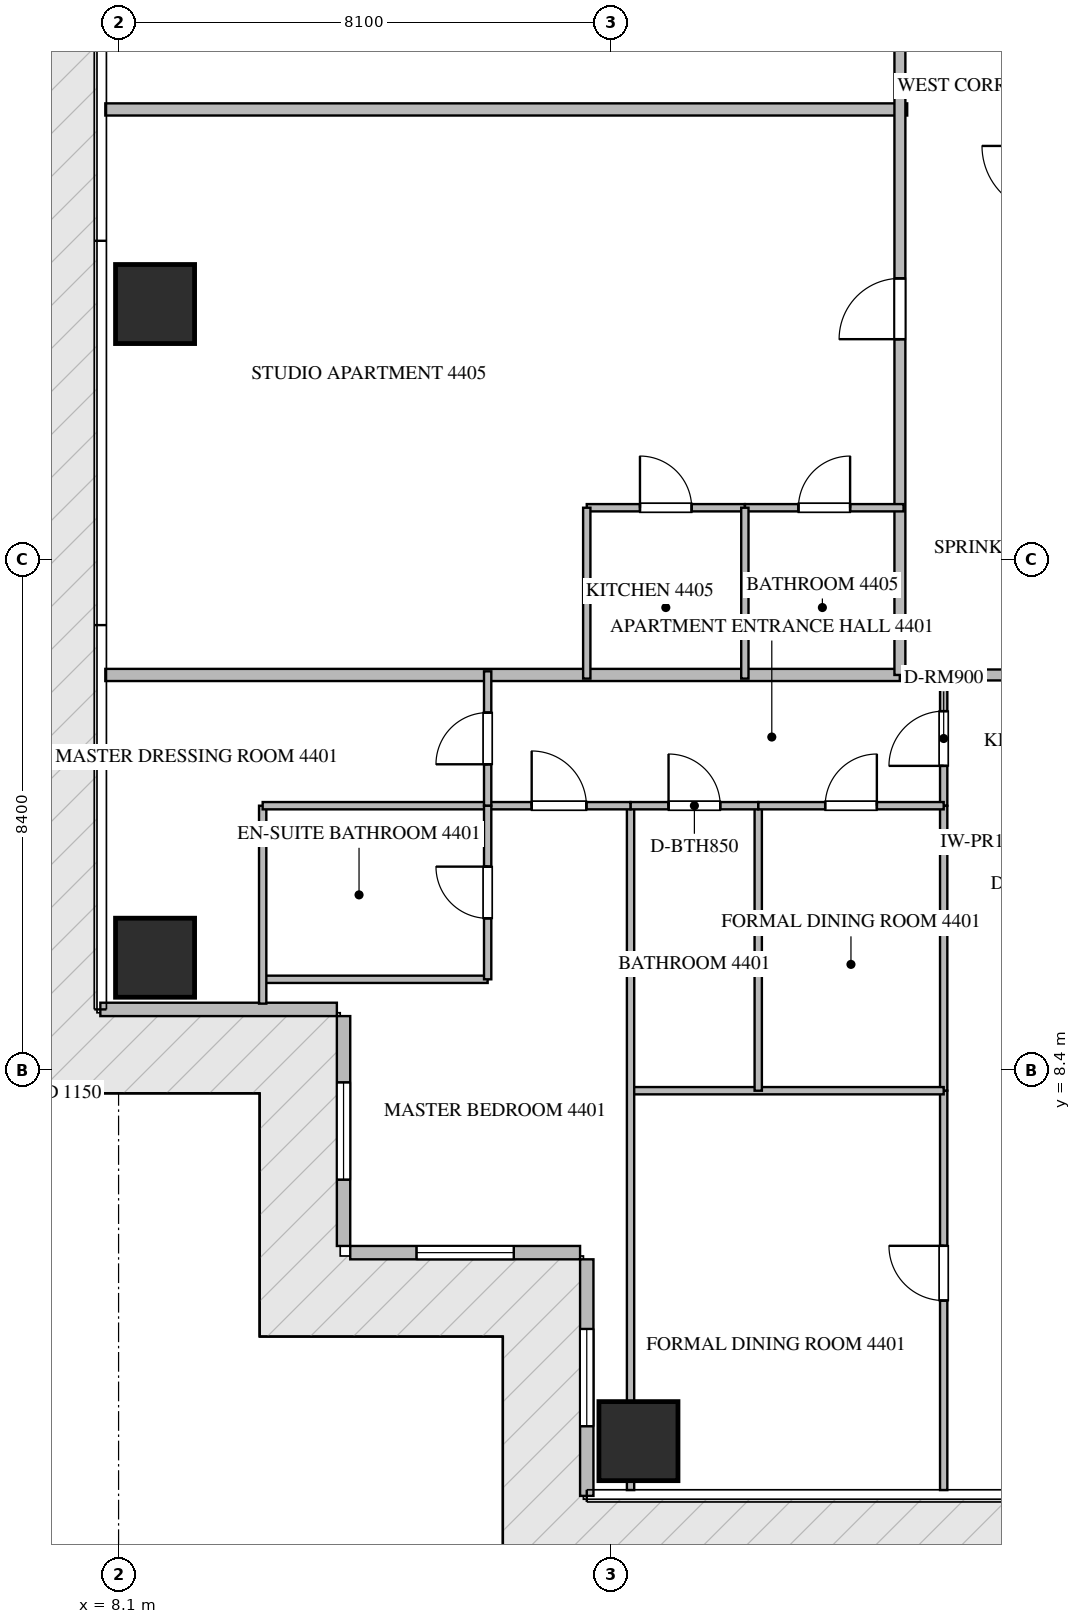
"""IFC4 building model, lengths in metres.
Left out: names, types, materials, properties, quantities, classifications, styles, units other than length and angle.
Written with IfcOpenShell. Run it as: python <this file> out.ifc"""

import sys

from ifc_helpers import new_model, si_unit, direction, frame, frame_2d, origin, origin_2d, place, context, subcontext, project, spatial, rectangle, extrude, source, transform, mapped, element, fill, save


model = new_model("IFC4")
c1 = context("Model", 3, precision=1e-05, world=origin(), true_north=direction((0.0, 1.0)))
c2 = subcontext(c1, "Body", "Model", "MODEL_VIEW")
j1 = project(units=[si_unit("LENGTHUNIT", "METRE"), si_unit("PLANEANGLEUNIT", "RADIAN")], contexts=[c1])
p1 = place(None, origin())
s1 = spatial("IfcSite", under=j1, at=p1, CompositionType="ELEMENT")
p2 = place(p1, origin())
s2 = spatial("IfcBuilding", under=s1, at=p2, CompositionType="ELEMENT")
p3 = place(p2, frame((0.0, 0.0, 176.4)))
s3 = spatial("IfcBuildingStorey", under=s2, at=p3, CompositionType="ELEMENT", Elevation=176.4)
m1 = source(origin(), c2, "Body", "SweptSolid", [
    extrude(rectangle(XDim=1.3, YDim=1.3, at=origin_2d()), origin(), (0.0, 0.0, 1.0), 3.75),
])
for number, where, z_axis, x_axis in (
    (1, (16.65, 2.3, -0.26), (0.0, 0.0, 1.0), (1.0, 0.0, 0.0)),
    (2, (8.7, 10.25, -0.26), (0.0, 0.0, 1.0), (1.0, 0.0, 0.0)),
    (3, (8.7, 21.0, -0.26), (0.0, 0.0, 1.0), (1.0, 0.0, 0.0)),
):
    element("IfcColumn", number, at=place(p3, frame(where, z_axis=z_axis, x_axis=x_axis)), inside=s3, PredefinedType="COLUMN", context=c2, shape_type="MappedRepresentation", body=[
        mapped(m1, transform((0.0, 0.0, 0.0), scale=1.0)),
    ])
p4 = place(p3, frame((7.8, 9.4, 0.0), z_axis=(0.0, 0.0, 1.0), x_axis=(1.0, 0.0, 0.0)))
e4 = element("IfcWall", 4, at=p4, inside=s3, PredefinedType="ELEMENTEDWALL", context=c2, shape_type="SweptSolid", body=[
    extrude(rectangle(XDim=3.89, YDim=0.22, at=frame_2d((1.945, 0.0))), origin(), (0.0, 0.0, 1.0), 3.475),
])
p5 = place(p3, frame((11.8, 9.29, 0.0), z_axis=(0.0, 0.0, 1.0), x_axis=(0.0, -1.0, 0.0)))
e5 = element("IfcWall", 5, at=p5, inside=s3, PredefinedType="ELEMENTEDWALL", context=c2, shape_type="SweptSolid", body=[
    extrude(rectangle(XDim=3.78, YDim=0.22, at=frame_2d((1.89, 0.0))), origin(), (0.0, 0.0, 1.0), 3.475),
])
p6 = place(p5, frame((1.09, 0.0, 0.65)))
e6 = element("IfcOpeningElement", 6, at=p6, cuts=e5, PredefinedType="OPENING", context=c2, shape_type="SweptSolid", body=[
    extrude(rectangle(XDim=1.6, YDim=2.1, at=frame_2d((0.8, 1.05))), frame((0.0, 0.12, 0.0), z_axis=(0.0, -1.0, 0.0), x_axis=(1.0, 0.0, 0.0)), (0.0, 0.0, 1.0), 0.24),
])
p7 = place(p3, frame((11.91, 5.4, 0.0), z_axis=(0.0, 0.0, 1.0), x_axis=(1.0, 0.0, 0.0)))
e7 = element("IfcWall", 7, at=p7, inside=s3, PredefinedType="ELEMENTEDWALL", context=c2, shape_type="SweptSolid", body=[
    extrude(rectangle(XDim=3.78, YDim=0.22, at=frame_2d((1.89, 0.0))), origin(), (0.0, 0.0, 1.0), 3.475),
])
p8 = place(p7, frame((1.09, 0.0, 0.65)))
e8 = element("IfcOpeningElement", 8, at=p8, cuts=e7, PredefinedType="OPENING", context=c2, shape_type="SweptSolid", body=[
    extrude(rectangle(XDim=1.6, YDim=2.1, at=frame_2d((0.8, 1.05))), frame((0.0, 0.12, 0.0), z_axis=(0.0, -1.0, 0.0), x_axis=(1.0, 0.0, 0.0)), (0.0, 0.0, 1.0), 0.24),
])
p9 = place(p3, frame((15.8, 5.29, 0.0), z_axis=(0.0, 0.0, 1.0), x_axis=(0.0, -1.0, 0.0)))
e9 = element("IfcWall", 9, at=p9, inside=s3, PredefinedType="ELEMENTEDWALL", context=c2, shape_type="SweptSolid", body=[
    extrude(rectangle(XDim=3.89, YDim=0.22, at=frame_2d((1.945, 0.0))), origin(), (0.0, 0.0, 1.0), 3.475),
])
p10 = place(p9, frame((1.145, 0.0, 0.65)))
e10 = element("IfcOpeningElement", 10, at=p10, cuts=e9, PredefinedType="OPENING", context=c2, shape_type="SweptSolid", body=[
    extrude(rectangle(XDim=1.6, YDim=2.1, at=frame_2d((0.8, 1.05))), frame((0.0, 0.12, 0.0), z_axis=(0.0, -1.0, 0.0), x_axis=(1.0, 0.0, 0.0)), (0.0, 0.0, 1.0), 0.24),
])
p11 = place(p3, frame((7.882, 24.2, 0.0), z_axis=(0.0, 0.0, 1.0), x_axis=(1.0, 0.0, 0.0)))
e11 = element("IfcWall", 11, at=p11, inside=s3, PredefinedType="PARTITIONING", context=c2, shape_type="SweptSolid", body=[
    extrude(rectangle(XDim=13.188, YDim=0.2, at=frame_2d((6.594, 0.0))), origin(), (0.0, 0.0, 1.0), 3.49),
])
p12 = place(p3, frame((7.882, 14.9, 0.0), z_axis=(0.0, 0.0, 1.0), x_axis=(1.0, 0.0, 0.0)))
e12 = element("IfcWall", 12, at=p12, inside=s3, PredefinedType="PARTITIONING", context=c2, shape_type="SweptSolid", body=[
    extrude(rectangle(XDim=13.068, YDim=0.2, at=frame_2d((6.534, 0.0))), origin(), (0.0, 0.0, 1.0), 3.49),
])
p13 = place(p3, frame((20.952, 14.9, 0.0), z_axis=(0.0, 0.0, 1.0), x_axis=(1.0, 0.0, 0.0)))
e13 = element("IfcWall", 13, at=p13, inside=s3, PredefinedType="PARTITIONING", context=c2, shape_type="SweptSolid", body=[
    extrude(rectangle(XDim=22.896, YDim=0.18, at=frame_2d((11.448, 0.0))), origin(), (0.0, 0.0, 1.0), 3.49),
])
p14 = place(p13, frame((5.934, 0.0, 0.0)))
e14 = element("IfcOpeningElement", 14, at=p14, cuts=e13, PredefinedType="OPENING", context=c2, shape_type="SweptSolid", body=[
    extrude(rectangle(XDim=1.0, YDim=2.15, at=frame_2d((0.5, 1.075))), frame((0.0, 0.1, 0.0), z_axis=(0.0, -1.0, 0.0), x_axis=(1.0, 0.0, 0.0)), (0.0, 0.0, 1.0), 0.2),
])
p15 = place(p13, frame((16.51, 0.0, 0.0)))
e15 = element("IfcOpeningElement", 15, at=p15, cuts=e13, PredefinedType="OPENING", context=c2, shape_type="SweptSolid", body=[
    extrude(rectangle(XDim=1.0, YDim=2.15, at=frame_2d((0.5, 1.075))), frame((0.0, 0.1, 0.0), z_axis=(0.0, -1.0, 0.0), x_axis=(1.0, 0.0, 0.0)), (0.0, 0.0, 1.0), 0.2),
])
p16 = place(p3, frame((20.95, 14.9, 0.0), z_axis=(0.0, 0.0, 1.0), x_axis=(0.0, 1.0, 0.0)))
e16 = element("IfcWall", 16, at=p16, inside=s3, PredefinedType="PARTITIONING", context=c2, shape_type="SweptSolid", body=[
    extrude(rectangle(XDim=18.7, YDim=0.18, at=frame_2d((9.35, 0.0))), origin(), (0.0, 0.0, 1.0), 3.49),
])
p17 = place(p16, frame((5.522, 0.0, 0.0)))
e17 = element("IfcOpeningElement", 17, at=p17, cuts=e16, PredefinedType="OPENING", context=c2, shape_type="SweptSolid", body=[
    extrude(rectangle(XDim=1.0, YDim=2.15, at=frame_2d((0.5, 1.075))), frame((0.0, 0.1, 0.0), z_axis=(0.0, -1.0, 0.0), x_axis=(1.0, 0.0, 0.0)), (0.0, 0.0, 1.0), 0.2),
])
p18 = place(p16, frame((10.602, 0.0, 0.0)))
e18 = element("IfcOpeningElement", 18, at=p18, cuts=e16, PredefinedType="OPENING", context=c2, shape_type="SweptSolid", body=[
    extrude(rectangle(XDim=1.0, YDim=2.15, at=frame_2d((0.5, 1.075))), frame((0.0, 0.1, 0.0), z_axis=(0.0, -1.0, 0.0), x_axis=(1.0, 0.0, 0.0)), (0.0, 0.0, 1.0), 0.2),
])
p19 = place(p3, frame((21.67, 12.15, 0.0), z_axis=(0.0, 0.0, 1.0), x_axis=(1.0, 0.0, 0.0)))
e19 = element("IfcWall", 19, at=p19, inside=s3, PredefinedType="PARTITIONING", context=c2, shape_type="SweptSolid", body=[
    extrude(rectangle(XDim=2.85, YDim=0.12, at=frame_2d((1.425, 0.0))), origin(), (0.0, 0.0, 1.0), 3.49),
])
p20 = place(p19, frame((1.0, 0.0, 0.0)))
e20 = element("IfcOpeningElement", 20, at=p20, cuts=e19, PredefinedType="OPENING", context=c2, shape_type="SweptSolid", body=[
    extrude(rectangle(XDim=0.85, YDim=2.1, at=frame_2d((0.425, 1.05))), frame((0.0, 0.07, 0.0), z_axis=(0.0, -1.0, 0.0), x_axis=(1.0, 0.0, 0.0)), (0.0, 0.0, 1.0), 0.14),
])
p21 = place(p3, frame((21.67, 12.75, 0.0), z_axis=(0.0, 0.0, 1.0), x_axis=(0.0, 1.0, 0.0)))
e21 = element("IfcWall", 21, at=p21, inside=s3, PredefinedType="PARTITIONING", context=c2, shape_type="SweptSolid", body=[
    extrude(rectangle(XDim=2.21, YDim=0.12, at=frame_2d((1.105, 0.0))), origin(), (0.0, 0.0, 1.0), 3.49),
])
p22 = place(p21, frame((0.655, 0.0, 0.0)))
e22 = element("IfcOpeningElement", 22, at=p22, cuts=e21, PredefinedType="OPENING", context=c2, shape_type="SweptSolid", body=[
    extrude(rectangle(XDim=0.9, YDim=2.1, at=frame_2d((0.45, 1.05))), frame((0.0, 0.07, 0.0), z_axis=(0.0, -1.0, 0.0), x_axis=(1.0, 0.0, 0.0)), (0.0, 0.0, 1.0), 0.14),
])
p23 = place(p3, frame((21.67, 1.495, 0.0), z_axis=(0.0, 0.0, 1.0), x_axis=(0.0, 1.0, 0.0)))
e23 = element("IfcWall", 23, at=p23, inside=s3, PredefinedType="PARTITIONING", context=c2, shape_type="SweptSolid", body=[
    extrude(rectangle(XDim=6.568, YDim=0.12, at=frame_2d((3.284, 0.0))), origin(), (0.0, 0.0, 1.0), 3.49),
])
p24 = place(p23, frame((3.117, 0.0, 0.0)))
e24 = element("IfcOpeningElement", 24, at=p24, cuts=e23, PredefinedType="OPENING", context=c2, shape_type="SweptSolid", body=[
    extrude(rectangle(XDim=0.9, YDim=2.1, at=frame_2d((0.45, 1.05))), frame((0.0, 0.07, 0.0), z_axis=(0.0, -1.0, 0.0), x_axis=(1.0, 0.0, 0.0)), (0.0, 0.0, 1.0), 0.14),
])
p25 = place(p3, frame((21.67, 8.065, 0.0), z_axis=(0.0, 0.0, 1.0), x_axis=(0.0, 1.0, 0.0)))
e25 = element("IfcWall", 25, at=p25, inside=s3, PredefinedType="PARTITIONING", context=c2, shape_type="SweptSolid", body=[
    extrude(rectangle(XDim=4.683, YDim=0.12, at=frame_2d((2.342, 0.0))), origin(), (0.0, 0.0, 1.0), 3.49),
])
p26 = place(p3, frame((16.52, 8.063, 0.0), z_axis=(0.0, 0.0, 1.0), x_axis=(1.0, 0.0, 0.0)))
e26 = element("IfcWall", 26, at=p26, inside=s3, PredefinedType="PARTITIONING", context=c2, shape_type="SweptSolid", body=[
    extrude(rectangle(XDim=5.15, YDim=0.12, at=frame_2d((2.575, 0.0))), origin(), (0.0, 0.0, 1.0), 3.49),
])
p27 = place(p3, frame((16.52, 1.495, 0.0), z_axis=(0.0, 0.0, 1.0), x_axis=(0.0, 1.0, 0.0)))
e27 = element("IfcWall", 27, at=p27, inside=s3, PredefinedType="PARTITIONING", context=c2, shape_type="SweptSolid", body=[
    extrude(rectangle(XDim=11.255, YDim=0.12, at=frame_2d((5.627, 0.0))), origin(), (0.0, 0.0, 1.0), 2.972),
])
p28 = place(p3, frame((18.62, 8.063, 0.0), z_axis=(0.0, 0.0, 1.0), x_axis=(0.0, 1.0, 0.0)))
e28 = element("IfcWall", 28, at=p28, inside=s3, PredefinedType="PARTITIONING", context=c2, shape_type="SweptSolid", body=[
    extrude(rectangle(XDim=4.687, YDim=0.12, at=frame_2d((2.344, 0.0))), origin(), (0.0, 0.0, 1.0), 3.49),
])
p29 = place(p3, frame((16.52, 12.75, 0.0), z_axis=(0.0, 0.0, 1.0), x_axis=(1.0, 0.0, 0.0)))
e29 = element("IfcWall", 29, at=p29, inside=s3, PredefinedType="PARTITIONING", context=c2, shape_type="SweptSolid", body=[
    extrude(rectangle(XDim=2.1, YDim=0.12, at=frame_2d((1.05, 0.0))), origin(), (0.0, 0.0, 1.0), 3.49),
])
p30 = place(p29, frame((0.625, 0.0, 0.0)))
e30 = element("IfcOpeningElement", 30, at=p30, cuts=e29, PredefinedType="OPENING", context=c2, shape_type="SweptSolid", body=[
    extrude(rectangle(XDim=0.85, YDim=2.1, at=frame_2d((0.425, 1.05))), frame((0.0, 0.07, 0.0), z_axis=(0.0, -1.0, 0.0), x_axis=(1.0, 0.0, 0.0)), (0.0, 0.0, 1.0), 0.14),
])
p31 = place(p3, frame((18.622, 12.75, 0.0), z_axis=(0.0, 0.0, 1.0), x_axis=(1.0, 0.0, 0.0)))
e31 = element("IfcWall", 31, at=p31, inside=s3, PredefinedType="PARTITIONING", context=c2, shape_type="SweptSolid", body=[
    extrude(rectangle(XDim=3.048, YDim=0.12, at=frame_2d((1.524, 0.0))), origin(), (0.0, 0.0, 1.0), 3.49),
])
p32 = place(p31, frame((1.099, 0.0, 0.0)))
e32 = element("IfcOpeningElement", 32, at=p32, cuts=e31, PredefinedType="OPENING", context=c2, shape_type="SweptSolid", body=[
    extrude(rectangle(XDim=0.85, YDim=2.1, at=frame_2d((0.425, 1.05))), frame((0.0, 0.07, 0.0), z_axis=(0.0, -1.0, 0.0), x_axis=(1.0, 0.0, 0.0)), (0.0, 0.0, 1.0), 0.14),
])
p33 = place(p3, frame((14.17, 12.75, 0.0), z_axis=(0.0, 0.0, 1.0), x_axis=(1.0, 0.0, 0.0)))
e33 = element("IfcWall", 33, at=p33, inside=s3, PredefinedType="PARTITIONING", context=c2, shape_type="SweptSolid", body=[
    extrude(rectangle(XDim=2.348, YDim=0.12, at=frame_2d((1.174, 0.0))), origin(), (0.0, 0.0, 1.0), 3.49),
])
p34 = place(p33, frame((0.724, 0.0, 0.0)))
e34 = element("IfcOpeningElement", 34, at=p34, cuts=e33, PredefinedType="OPENING", context=c2, shape_type="SweptSolid", body=[
    extrude(rectangle(XDim=0.9, YDim=2.1, at=frame_2d((0.45, 1.05))), frame((0.0, 0.07, 0.0), z_axis=(0.0, -1.0, 0.0), x_axis=(1.0, 0.0, 0.0)), (0.0, 0.0, 1.0), 0.14),
])
p35 = place(p3, frame((10.47, 9.895, 0.0), z_axis=(0.0, 0.0, 1.0), x_axis=(1.0, 0.0, 0.0)))
e35 = element("IfcWall", 35, at=p35, inside=s3, PredefinedType="PARTITIONING", context=c2, shape_type="SweptSolid", body=[
    extrude(rectangle(XDim=3.7, YDim=0.12, at=frame_2d((1.85, 0.0))), origin(), (0.0, 0.0, 1.0), 3.49),
])
p36 = place(p3, frame((10.47, 9.495, 0.0), z_axis=(0.0, 0.0, 1.0), x_axis=(0.0, 1.0, 0.0)))
e36 = element("IfcWall", 36, at=p36, inside=s3, PredefinedType="PARTITIONING", context=c2, shape_type="SweptSolid", body=[
    extrude(rectangle(XDim=3.255, YDim=0.12, at=frame_2d((1.627, 0.0))), origin(), (0.0, 0.0, 1.0), 3.49),
])
p37 = place(p3, frame((10.47, 12.75, 0.0), z_axis=(0.0, 0.0, 1.0), x_axis=(1.0, 0.0, 0.0)))
e37 = element("IfcWall", 37, at=p37, inside=s3, PredefinedType="PARTITIONING", context=c2, shape_type="SweptSolid", body=[
    extrude(rectangle(XDim=3.698, YDim=0.12, at=frame_2d((1.849, 0.0))), origin(), (0.0, 0.0, 1.0), 3.49),
])
p38 = place(p3, frame((14.17, 9.895, 0.0), z_axis=(0.0, 0.0, 1.0), x_axis=(0.0, 1.0, 0.0)))
e38 = element("IfcWall", 38, at=p38, inside=s3, PredefinedType="PARTITIONING", context=c2, shape_type="SweptSolid", body=[
    extrude(rectangle(XDim=2.855, YDim=0.12, at=frame_2d((1.427, 0.0))), origin(), (0.0, 0.0, 1.0), 3.49),
])
p39 = place(p38, frame((1.003, 0.0, 0.0)))
e39 = element("IfcOpeningElement", 39, at=p39, cuts=e38, PredefinedType="OPENING", context=c2, shape_type="SweptSolid", body=[
    extrude(rectangle(XDim=0.85, YDim=2.1, at=frame_2d((0.425, 1.05))), frame((0.0, 0.07, 0.0), z_axis=(0.0, -1.0, 0.0), x_axis=(1.0, 0.0, 0.0)), (0.0, 0.0, 1.0), 0.14),
])
p40 = place(p3, frame((14.17, 12.752, 0.0), z_axis=(0.0, 0.0, 1.0), x_axis=(0.0, 1.0, 0.0)))
e40 = element("IfcWall", 40, at=p40, inside=s3, PredefinedType="PARTITIONING", context=c2, shape_type="SweptSolid", body=[
    extrude(rectangle(XDim=2.208, YDim=0.12, at=frame_2d((1.104, 0.0))), origin(), (0.0, 0.0, 1.0), 3.49),
])
p41 = place(p40, frame((0.679, 0.0, 0.0)))
e41 = element("IfcOpeningElement", 41, at=p41, cuts=e40, PredefinedType="OPENING", context=c2, shape_type="SweptSolid", body=[
    extrude(rectangle(XDim=0.85, YDim=2.1, at=frame_2d((0.425, 1.05))), frame((0.0, 0.07, 0.0), z_axis=(0.0, -1.0, 0.0), x_axis=(1.0, 0.0, 0.0)), (0.0, 0.0, 1.0), 0.14),
])
p42 = place(p3, frame((15.8, 17.65, 0.0), z_axis=(0.0, 0.0, 1.0), x_axis=(1.0, 0.0, 0.0)))
e42 = element("IfcWall", 42, at=p42, inside=s3, PredefinedType="PARTITIONING", context=c2, shape_type="SweptSolid", body=[
    extrude(rectangle(XDim=2.6, YDim=0.12, at=frame_2d((1.3, 0.0))), origin(), (0.0, 0.0, 1.0), 3.49),
])
p43 = place(p42, frame((0.875, 0.0, 0.0)))
e43 = element("IfcOpeningElement", 43, at=p43, cuts=e42, PredefinedType="OPENING", context=c2, shape_type="SweptSolid", body=[
    extrude(rectangle(XDim=0.85, YDim=2.1, at=frame_2d((0.425, 1.05))), frame((0.0, 0.07, 0.0), z_axis=(0.0, -1.0, 0.0), x_axis=(1.0, 0.0, 0.0)), (0.0, 0.0, 1.0), 0.14),
])
p44 = place(p3, frame((18.402, 17.65, 0.0), z_axis=(0.0, 0.0, 1.0), x_axis=(1.0, 0.0, 0.0)))
e44 = element("IfcWall", 44, at=p44, inside=s3, PredefinedType="PARTITIONING", context=c2, shape_type="SweptSolid", body=[
    extrude(rectangle(XDim=2.608, YDim=0.12, at=frame_2d((1.304, 0.0))), origin(), (0.0, 0.0, 1.0), 3.49),
])
p45 = place(p44, frame((0.879, 0.0, 0.0)))
e45 = element("IfcOpeningElement", 45, at=p45, cuts=e44, PredefinedType="OPENING", context=c2, shape_type="SweptSolid", body=[
    extrude(rectangle(XDim=0.85, YDim=2.1, at=frame_2d((0.425, 1.05))), frame((0.0, 0.07, 0.0), z_axis=(0.0, -1.0, 0.0), x_axis=(1.0, 0.0, 0.0)), (0.0, 0.0, 1.0), 0.14),
])
for number, where, z_axis, x_axis in (
    (46, (18.4, 14.84, 0.0), (0.0, 0.0, 1.0), (0.0, 1.0, 0.0)),
    (47, (15.8, 14.84, 0.0), (0.0, 0.0, 1.0), (0.0, 1.0, 0.0)),
):
    element("IfcWall", number, at=place(p3, frame(where, z_axis=z_axis, x_axis=x_axis)), inside=s3, PredefinedType="PARTITIONING", context=c2, shape_type="SweptSolid", body=[
        extrude(rectangle(XDim=2.81, YDim=0.12, at=frame_2d((1.405, 0.0))), origin(), (0.0, 0.0, 1.0), 3.49),
    ])
m2 = source(origin(), c2, "Body", "SweptSolid", [
    extrude(rectangle(XDim=1.6, YDim=2.1, at=frame_2d((0.8, 1.05))), frame((0.0, 0.03, 0.0), z_axis=(0.0, -1.0, 0.0), x_axis=(1.0, 0.0, 0.0)), (0.0, 0.0, 1.0), 0.06),
])
p46 = place(p6, origin())
e48 = element("IfcWindow", 48, at=p46, inside=s3, PartitioningType="SINGLE_PANEL", PredefinedType="WINDOW", context=c2, shape_type="MappedRepresentation", body=[
    mapped(m2, transform((0.0, 0.0, 0.0), scale=1.0)),
])
fill(e6, e48)
p47 = place(p8, origin())
e49 = element("IfcWindow", 49, at=p47, inside=s3, PartitioningType="SINGLE_PANEL", PredefinedType="WINDOW", context=c2, shape_type="MappedRepresentation", body=[
    mapped(m2, transform((0.0, 0.0, 0.0), scale=1.0)),
])
fill(e8, e49)
p48 = place(p10, origin())
e50 = element("IfcWindow", 50, at=p48, inside=s3, PartitioningType="SINGLE_PANEL", PredefinedType="WINDOW", context=c2, shape_type="MappedRepresentation", body=[
    mapped(m2, transform((0.0, 0.0, 0.0), scale=1.0)),
])
fill(e10, e50)
m3 = source(origin(), c2, "Body", "SweptSolid", [
    extrude(rectangle(XDim=1.0, YDim=2.15, at=frame_2d((0.5, 1.075))), frame((0.0, 0.025, 0.0), z_axis=(0.0, -1.0, 0.0), x_axis=(1.0, 0.0, 0.0)), (0.0, 0.0, 1.0), 0.05),
])
p49 = place(p17, origin())
e51 = element("IfcDoor", 51, at=p49, inside=s3, OperationType="SINGLE_SWING_LEFT", PredefinedType="DOOR", context=c2, shape_type="MappedRepresentation", body=[
    mapped(m3, transform((0.0, 0.0, 0.0), scale=1.0)),
])
fill(e17, e51)
m4 = source(origin(), c2, "Body", "SweptSolid", [
    extrude(rectangle(XDim=0.9, YDim=2.1, at=frame_2d((0.45, 1.05))), frame((0.0, 0.025, 0.0), z_axis=(0.0, -1.0, 0.0), x_axis=(1.0, 0.0, 0.0)), (0.0, 0.0, 1.0), 0.05),
])
p50 = place(p22, origin())
e52 = element("IfcDoor", 52, at=p50, inside=s3, OperationType="SINGLE_SWING_LEFT", PredefinedType="DOOR", context=c2, shape_type="MappedRepresentation", body=[
    mapped(m4, transform((0.0, 0.0, 0.0), scale=1.0)),
])
fill(e22, e52)
p51 = place(p24, origin())
e53 = element("IfcDoor", 53, at=p51, inside=s3, OperationType="SINGLE_SWING_RIGHT", PredefinedType="DOOR", context=c2, shape_type="MappedRepresentation", body=[
    mapped(m4, transform((0.0, 0.0, 0.0), scale=1.0)),
])
fill(e24, e53)
m5 = source(origin(), c2, "Body", "SweptSolid", [
    extrude(rectangle(XDim=0.85, YDim=2.1, at=frame_2d((0.425, 1.05))), frame((0.0, 0.025, 0.0), z_axis=(0.0, -1.0, 0.0), x_axis=(1.0, 0.0, 0.0)), (0.0, 0.0, 1.0), 0.05),
])
p52 = place(p30, origin())
e54 = element("IfcDoor", 54, at=p52, inside=s3, OperationType="SINGLE_SWING_LEFT", PredefinedType="DOOR", context=c2, shape_type="MappedRepresentation", body=[
    mapped(m5, transform((0.0, 0.0, 0.0), scale=1.0)),
])
fill(e30, e54)
p53 = place(p32, origin())
e55 = element("IfcDoor", 55, at=p53, inside=s3, OperationType="SINGLE_SWING_RIGHT", PredefinedType="DOOR", context=c2, shape_type="MappedRepresentation", body=[
    mapped(m5, transform((0.0, 0.0, 0.0), scale=1.0)),
])
fill(e32, e55)
p54 = place(p34, origin())
e56 = element("IfcDoor", 56, at=p54, inside=s3, OperationType="SINGLE_SWING_LEFT", PredefinedType="DOOR", context=c2, shape_type="MappedRepresentation", body=[
    mapped(m4, transform((0.0, 0.0, 0.0), scale=1.0)),
])
fill(e34, e56)
p55 = place(p39, origin())
e57 = element("IfcDoor", 57, at=p55, inside=s3, OperationType="SINGLE_SWING_RIGHT", PredefinedType="DOOR", context=c2, shape_type="MappedRepresentation", body=[
    mapped(m5, transform((0.0, 0.0, 0.0), scale=1.0)),
])
fill(e39, e57)
p56 = place(p41, origin())
e58 = element("IfcDoor", 58, at=p56, inside=s3, OperationType="SINGLE_SWING_LEFT", PredefinedType="DOOR", context=c2, shape_type="MappedRepresentation", body=[
    mapped(m5, transform((0.0, 0.0, 0.0), scale=1.0)),
])
fill(e41, e58)
p57 = place(p43, origin())
e59 = element("IfcDoor", 59, at=p57, inside=s3, OperationType="SINGLE_SWING_LEFT", PredefinedType="DOOR", context=c2, shape_type="MappedRepresentation", body=[
    mapped(m5, transform((0.0, 0.0, 0.0), scale=1.0)),
])
fill(e43, e59)
p58 = place(p45, origin())
e60 = element("IfcDoor", 60, at=p58, inside=s3, OperationType="SINGLE_SWING_RIGHT", PredefinedType="DOOR", context=c2, shape_type="MappedRepresentation", body=[
    mapped(m5, transform((0.0, 0.0, 0.0), scale=1.0)),
])
fill(e45, e60)
save(model, sys.argv[1])
